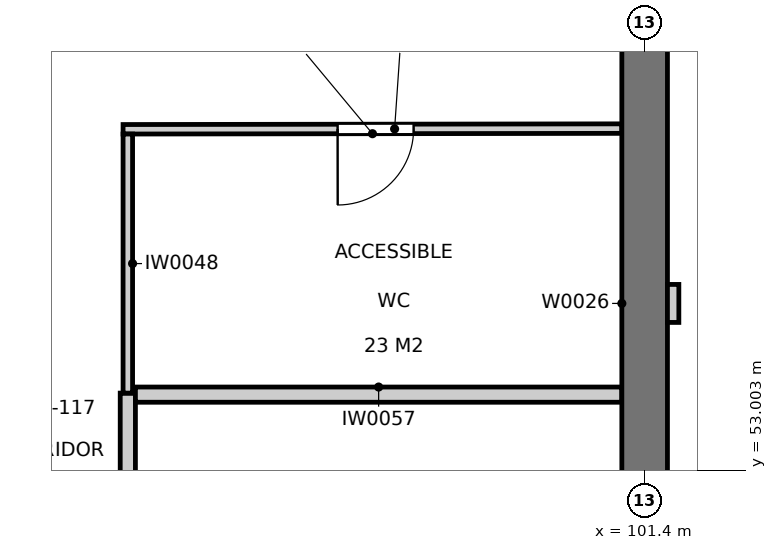
"""IFC4 building model, lengths in metres.
Left out: names, types, materials, properties, quantities, classifications, styles, units other than length and angle.
Written with IfcOpenShell. Run it as: python <this file> out.ifc"""

import sys

from ifc_helpers import new_model, si_unit, direction, frame, frame_2d, origin, place, context, subcontext, project, spatial, rectangle, extrude, element, fill, save


model = new_model("IFC4")
c1 = context("Model", 3, precision=1e-05, world=origin(), true_north=direction((0.0, 1.0)))
c2 = subcontext(c1, "Body", "Model", "MODEL_VIEW")
j1 = project(units=[si_unit("LENGTHUNIT", "METRE"), si_unit("PLANEANGLEUNIT", "RADIAN")], contexts=[c1])
p1 = place(None, origin())
s1 = spatial("IfcSite", under=j1, at=p1, CompositionType="ELEMENT")
p2 = place(p1, origin())
s2 = spatial("IfcBuilding", under=s1, at=p2, CompositionType="ELEMENT")
p3 = place(p2, frame((0.0, 0.0, 9.6)))
s3 = spatial("IfcBuildingStorey", under=s2, at=p3, CompositionType="ELEMENT", Elevation=9.6)
p4 = place(p3, frame((101.4, 51.3, 0.0), z_axis=(0.0, 0.0, 1.0), x_axis=(0.0, 1.0, 0.0)))
e1 = element("IfcWall", 1, at=p4, inside=s3, PredefinedType="SOLIDWALL", context=c2, shape_type="SweptSolid", body=[
    extrude(rectangle(XDim=7.8, YDim=0.6, at=frame_2d((3.9, 0.0))), origin(), (0.0, 0.0, 1.0), 4.8),
])
p5 = place(p3, frame((94.6, 54.02, 0.0), z_axis=(0.0, 0.0, 1.0), x_axis=(-0.000122070312, -0.999999992549, 0.0)))
e2 = element("IfcWall", 2, at=p5, inside=s3, PredefinedType="PARTITIONING", context=c2, shape_type="SweptSolid", body=[
    extrude(rectangle(XDim=8.0, YDim=0.2, at=frame_2d((4.0, 0.0))), origin(), (0.0, 0.0, 1.0), 3.84),
])
p6 = place(p5, frame((3.53, 0.0, 0.0)))
e3 = element("IfcOpeningElement", 3, at=p6, cuts=e2, PredefinedType="OPENING", context=c2, shape_type="SweptSolid", body=[
    extrude(rectangle(XDim=1.0, YDim=2.1, at=frame_2d((0.5, 1.05))), frame((0.0, 0.11, 0.0), z_axis=(0.0, -1.0, 0.0), x_axis=(1.0, 0.0, 0.0)), (0.0, 0.0, 1.0), 0.22),
])
p7 = place(p3, frame((101.1, 57.5, 0.0), z_axis=(0.0, 0.0, 1.0), x_axis=(-0.999999052642, -0.001376486791, 0.0)))
e4 = element("IfcWall", 4, at=p7, inside=s3, PredefinedType="PARTITIONING", context=c2, shape_type="SweptSolid", body=[
    extrude(rectangle(XDim=6.562, YDim=0.125, at=frame_2d((3.281, 0.0))), origin(), (0.0, 0.0, 1.0), 4.64),
])
p8 = place(p7, frame((2.74, 0.0, 0.0)))
e5 = element("IfcOpeningElement", 5, at=p8, cuts=e4, PredefinedType="OPENING", context=c2, shape_type="SweptSolid", body=[
    extrude(rectangle(XDim=1.0, YDim=2.1, at=frame_2d((0.5, 1.05))), frame((0.0, 0.073, 0.0), z_axis=(0.0, -1.0, 0.0), x_axis=(1.0, 0.0, 0.0)), (0.0, 0.0, 1.0), 0.145),
])
p9 = place(p3, frame((94.6, 57.428, 0.0), z_axis=(0.0, 0.0, 1.0), x_axis=(0.0, -1.0, 0.0)))
e6 = element("IfcWall", 6, at=p9, inside=s3, PredefinedType="PARTITIONING", context=c2, shape_type="SweptSolid", body=[
    extrude(rectangle(XDim=3.408, YDim=0.125, at=frame_2d((1.704, 0.0))), origin(), (0.0, 0.0, 1.0), 3.94),
])
p10 = place(p3, frame((94.7, 54.0, 0.0), z_axis=(0.0, 0.0, 1.0), x_axis=(1.0, 0.0, 0.0)))
e7 = element("IfcWall", 7, at=p10, inside=s3, PredefinedType="PARTITIONING", context=c2, shape_type="SweptSolid", body=[
    extrude(rectangle(XDim=6.4, YDim=0.2, at=frame_2d((3.2, 0.0))), origin(), (0.0, 0.0, 1.0), 3.94),
])
p11 = place(p3, frame((101.775, 54.95, 0.0), z_axis=(0.0, 0.0, 1.0), x_axis=(0.0, 1.0, 0.0)))
e8 = element("IfcWall", 8, at=p11, inside=s3, PredefinedType="SOLIDWALL", context=c2, shape_type="SweptSolid", body=[
    extrude(rectangle(XDim=0.5, YDim=0.15, at=frame_2d((0.25, 0.0))), origin(), (0.0, 0.0, 1.0), 4.8),
])
p12 = place(p8, origin())
e9 = element("IfcDoor", 9, at=p12, inside=s3, OperationType="SINGLE_SWING_RIGHT", PredefinedType="DOOR", context=c2, shape_type="SweptSolid", body=[
    extrude(rectangle(XDim=1.0, YDim=2.1, at=frame_2d((0.5, 1.05))), frame((0.0, 0.025, 0.0), z_axis=(0.0, -1.0, 0.0), x_axis=(1.0, 0.0, 0.0)), (0.0, 0.0, 1.0), 0.05),
])
fill(e5, e9)
save(model, sys.argv[1])
